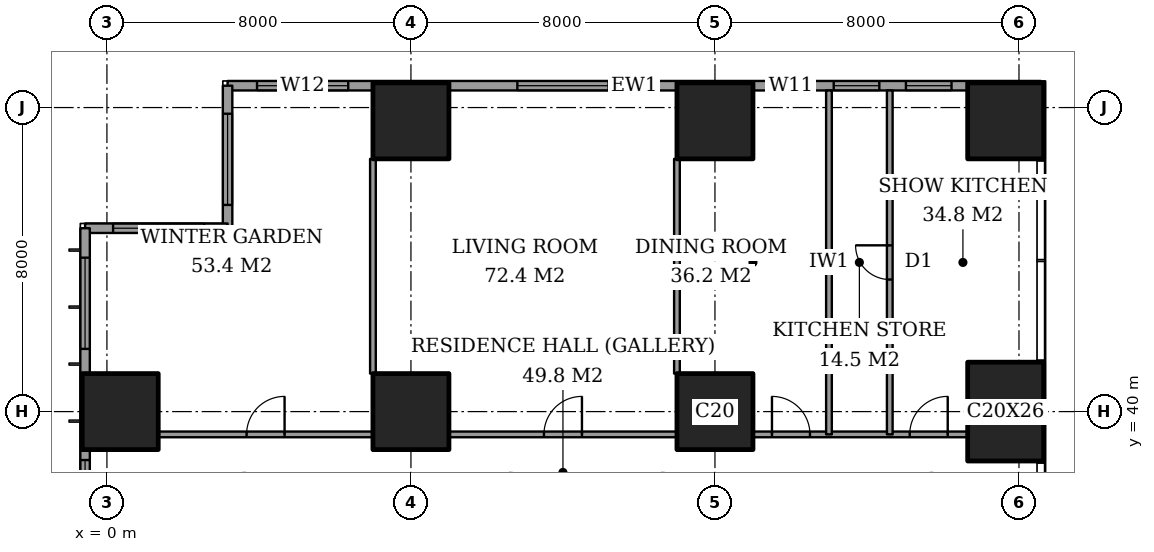
"""IFC4 building model, lengths in metres.
Left out: names, types, materials, properties, quantities, classifications, styles, units other than length and angle.
Written with IfcOpenShell. Run it as: python <this file> out.ifc"""

import sys

from ifc_helpers import new_model, si_unit, direction, frame, frame_2d, origin, origin_2d, place, context, subcontext, project, spatial, rectangle, extrude, element, fill, save


model = new_model("IFC4")
c1 = context("Model", 3, precision=1e-05, world=origin(), true_north=direction((0.0, 1.0)))
c2 = subcontext(c1, "Body", "Model", "MODEL_VIEW")
j1 = project(units=[si_unit("LENGTHUNIT", "METRE"), si_unit("PLANEANGLEUNIT", "RADIAN")], contexts=[c1])
p1 = place(None, origin())
s1 = spatial("IfcSite", under=j1, at=p1, CompositionType="ELEMENT")
p2 = place(p1, origin())
s2 = spatial("IfcBuilding", under=s1, at=p2, CompositionType="ELEMENT")
p3 = place(p2, frame((0.0, 0.0, 135.8)))
s3 = spatial("IfcBuildingStorey", under=s2, at=p3, CompositionType="ELEMENT", Elevation=135.8)
for number, where, z_axis, x_axis in (
    (1, (0.35, 40.0, 0.0), (0.0, 0.0, 1.0), (1.0, 0.0, 0.0)),
    (2, (8.0, 40.0, 0.0), (0.0, 0.0, 1.0), (1.0, 0.0, 0.0)),
    (3, (8.0, 47.65, 0.0), (0.0, 0.0, 1.0), (1.0, 0.0, 0.0)),
    (4, (16.0, 40.0, 0.0), (0.0, 0.0, 1.0), (1.0, 0.0, 0.0)),
    (5, (16.0, 47.65, 0.0), (0.0, 0.0, 1.0), (1.0, 0.0, 0.0)),
):
    element("IfcColumn", number, at=place(p3, frame(where, z_axis=z_axis, x_axis=x_axis)), inside=s3, PredefinedType="COLUMN", context=c2, shape_type="SweptSolid", body=[
        extrude(rectangle(XDim=2.0, YDim=2.0, at=origin_2d()), origin(), (0.0, 0.0, 1.0), 3.6),
    ])
p4 = place(p3, frame((23.65, 40.0, 0.0), z_axis=(0.0, 0.0, 1.0), x_axis=(1.0, 0.0, 0.0)))
e6 = element("IfcColumn", 6, at=p4, inside=s3, PredefinedType="COLUMN", context=c2, shape_type="SweptSolid", body=[
    extrude(rectangle(XDim=2.0, YDim=2.6, at=origin_2d()), origin(), (0.0, 0.0, 1.0), 3.6),
])
p5 = place(p3, frame((23.65, 47.65, 0.0), z_axis=(0.0, 0.0, 1.0), x_axis=(1.0, 0.0, 0.0)))
e7 = element("IfcColumn", 7, at=p5, inside=s3, PredefinedType="COLUMN", context=c2, shape_type="SweptSolid", body=[
    extrude(rectangle(XDim=2.0, YDim=2.0, at=origin_2d()), origin(), (0.0, 0.0, 1.0), 3.6),
])
p6 = place(p3, frame((24.575, 48.575, 0.0), z_axis=(0.0, 0.0, 1.0), x_axis=(-1.0, 0.0, 0.0)))
e8 = element("IfcWall", 8, at=p6, inside=s3, PredefinedType="SOLIDWALL", context=c2, shape_type="SweptSolid", body=[
    extrude(rectangle(XDim=21.4, YDim=0.25, at=frame_2d((10.7, 0.0))), origin(), (0.0, 0.0, 1.0), 3.6),
])
p7 = place(p6, frame((2.35, 0.0, 0.4)))
e9 = element("IfcOpeningElement", 9, at=p7, cuts=e8, PredefinedType="OPENING", context=c2, shape_type="SweptSolid", body=[
    extrude(rectangle(XDim=1.2, YDim=2.2, at=frame_2d((0.6, 1.1))), frame((0.0, 0.135, 0.0), z_axis=(0.0, -1.0, 0.0), x_axis=(1.0, 0.0, 0.0)), (0.0, 0.0, 1.0), 0.27),
])
p8 = place(p6, frame((4.25, 0.0, 0.4)))
e10 = element("IfcOpeningElement", 10, at=p8, cuts=e8, PredefinedType="OPENING", context=c2, shape_type="SweptSolid", body=[
    extrude(rectangle(XDim=1.2, YDim=2.2, at=frame_2d((0.6, 1.1))), frame((0.0, 0.135, 0.0), z_axis=(0.0, -1.0, 0.0), x_axis=(1.0, 0.0, 0.0)), (0.0, 0.0, 1.0), 0.27),
])
p9 = place(p6, frame((5.975, 0.0, 0.4)))
e11 = element("IfcOpeningElement", 11, at=p9, cuts=e8, PredefinedType="OPENING", context=c2, shape_type="SweptSolid", body=[
    extrude(rectangle(XDim=1.2, YDim=2.2, at=frame_2d((0.6, 1.1))), frame((0.0, 0.135, 0.0), z_axis=(0.0, -1.0, 0.0), x_axis=(1.0, 0.0, 0.0)), (0.0, 0.0, 1.0), 0.27),
])
p10 = place(p6, frame((11.375, 0.0, 0.4)))
e12 = element("IfcOpeningElement", 12, at=p10, cuts=e8, PredefinedType="OPENING", context=c2, shape_type="SweptSolid", body=[
    extrude(rectangle(XDim=2.4, YDim=2.2, at=frame_2d((1.2, 1.1))), frame((0.0, 0.135, 0.0), z_axis=(0.0, -1.0, 0.0), x_axis=(1.0, 0.0, 0.0)), (0.0, 0.0, 1.0), 0.27),
])
p11 = place(p6, frame((18.225, 0.0, 0.4)))
e13 = element("IfcOpeningElement", 13, at=p11, cuts=e8, PredefinedType="OPENING", context=c2, shape_type="SweptSolid", body=[
    extrude(rectangle(XDim=2.4, YDim=2.2, at=frame_2d((1.2, 1.1))), frame((0.0, 0.135, 0.0), z_axis=(0.0, -1.0, 0.0), x_axis=(1.0, 0.0, 0.0)), (0.0, 0.0, 1.0), 0.27),
])
p12 = place(p3, frame((3.175, 48.575, 0.0), z_axis=(0.0, 0.0, 1.0), x_axis=(0.0, -1.0, 0.0)))
e14 = element("IfcWall", 14, at=p12, inside=s3, PredefinedType="SOLIDWALL", context=c2, shape_type="SweptSolid", body=[
    extrude(rectangle(XDim=3.75, YDim=0.25, at=frame_2d((1.875, 0.0))), origin(), (0.0, 0.0, 1.0), 3.6),
])
p13 = place(p12, frame((0.738, 0.0, 0.4)))
e15 = element("IfcOpeningElement", 15, at=p13, cuts=e14, PredefinedType="OPENING", context=c2, shape_type="SweptSolid", body=[
    extrude(rectangle(XDim=2.4, YDim=2.2, at=frame_2d((1.2, 1.1))), frame((0.0, 0.135, 0.0), z_axis=(0.0, -1.0, 0.0), x_axis=(1.0, 0.0, 0.0)), (0.0, 0.0, 1.0), 0.27),
])
p14 = place(p3, frame((3.175, 44.825, 0.0), z_axis=(0.0, 0.0, 1.0), x_axis=(-1.0, 0.0, 0.0)))
e16 = element("IfcWall", 16, at=p14, inside=s3, PredefinedType="SOLIDWALL", context=c2, shape_type="SweptSolid", body=[
    extrude(rectangle(XDim=3.75, YDim=0.25, at=frame_2d((1.875, 0.0))), origin(), (0.0, 0.0, 1.0), 3.6),
])
p15 = place(p14, frame((0.613, 0.0, 0.4)))
e17 = element("IfcOpeningElement", 17, at=p15, cuts=e16, PredefinedType="OPENING", context=c2, shape_type="SweptSolid", body=[
    extrude(rectangle(XDim=2.4, YDim=2.2, at=frame_2d((1.2, 1.1))), frame((0.0, 0.135, 0.0), z_axis=(0.0, -1.0, 0.0), x_axis=(1.0, 0.0, 0.0)), (0.0, 0.0, 1.0), 0.27),
])
p16 = place(p3, frame((-0.575, 44.825, 0.0), z_axis=(0.0, 0.0, 1.0), x_axis=(0.0, -1.0, 0.0)))
e18 = element("IfcWall", 18, at=p16, inside=s3, PredefinedType="SOLIDWALL", context=c2, shape_type="SweptSolid", body=[
    extrude(rectangle(XDim=41.65, YDim=0.25, at=frame_2d((20.825, 0.0))), origin(), (0.0, 0.0, 1.0), 3.6),
])
p17 = place(p16, frame((0.775, 0.0, 0.4)))
e19 = element("IfcOpeningElement", 19, at=p17, cuts=e18, PredefinedType="OPENING", context=c2, shape_type="SweptSolid", body=[
    extrude(rectangle(XDim=2.4, YDim=2.2, at=frame_2d((1.2, 1.1))), frame((0.0, 0.135, 0.0), z_axis=(0.0, -1.0, 0.0), x_axis=(1.0, 0.0, 0.0)), (0.0, 0.0, 1.0), 0.27),
])
p18 = place(p16, frame((6.1, 0.0, 0.4)))
e20 = element("IfcOpeningElement", 20, at=p18, cuts=e18, PredefinedType="OPENING", context=c2, shape_type="SweptSolid", body=[
    extrude(rectangle(XDim=1.2, YDim=2.2, at=frame_2d((0.6, 1.1))), frame((0.0, 0.135, 0.0), z_axis=(0.0, -1.0, 0.0), x_axis=(1.0, 0.0, 0.0)), (0.0, 0.0, 1.0), 0.27),
])
p19 = place(p16, frame((8.425, 0.0, 0.4)))
e21 = element("IfcOpeningElement", 21, at=p19, cuts=e18, PredefinedType="OPENING", context=c2, shape_type="SweptSolid", body=[
    extrude(rectangle(XDim=2.4, YDim=2.2, at=frame_2d((1.2, 1.1))), frame((0.0, 0.135, 0.0), z_axis=(0.0, -1.0, 0.0), x_axis=(1.0, 0.0, 0.0)), (0.0, 0.0, 1.0), 0.27),
])
p20 = place(p16, frame((15.625, 0.0, 0.4)))
e22 = element("IfcOpeningElement", 22, at=p20, cuts=e18, PredefinedType="OPENING", context=c2, shape_type="SweptSolid", body=[
    extrude(rectangle(XDim=2.4, YDim=2.2, at=frame_2d((1.2, 1.1))), frame((0.0, 0.135, 0.0), z_axis=(0.0, -1.0, 0.0), x_axis=(1.0, 0.0, 0.0)), (0.0, 0.0, 1.0), 0.27),
])
p21 = place(p16, frame((23.625, 0.0, 0.4)))
e23 = element("IfcOpeningElement", 23, at=p21, cuts=e18, PredefinedType="OPENING", context=c2, shape_type="SweptSolid", body=[
    extrude(rectangle(XDim=2.4, YDim=2.2, at=frame_2d((1.2, 1.1))), frame((0.0, 0.135, 0.0), z_axis=(0.0, -1.0, 0.0), x_axis=(1.0, 0.0, 0.0)), (0.0, 0.0, 1.0), 0.27),
])
p22 = place(p16, frame((30.825, 0.0, 0.4)))
e24 = element("IfcOpeningElement", 24, at=p22, cuts=e18, PredefinedType="OPENING", context=c2, shape_type="SweptSolid", body=[
    extrude(rectangle(XDim=2.4, YDim=2.2, at=frame_2d((1.2, 1.1))), frame((0.0, 0.135, 0.0), z_axis=(0.0, -1.0, 0.0), x_axis=(1.0, 0.0, 0.0)), (0.0, 0.0, 1.0), 0.27),
])
p23 = place(p16, frame((34.5, 0.0, 0.4)))
e25 = element("IfcOpeningElement", 25, at=p23, cuts=e18, PredefinedType="OPENING", context=c2, shape_type="SweptSolid", body=[
    extrude(rectangle(XDim=1.2, YDim=2.2, at=frame_2d((0.6, 1.1))), frame((0.0, 0.135, 0.0), z_axis=(0.0, -1.0, 0.0), x_axis=(1.0, 0.0, 0.0)), (0.0, 0.0, 1.0), 0.27),
])
p24 = place(p16, frame((38.475, 0.0, 0.4)))
e26 = element("IfcOpeningElement", 26, at=p24, cuts=e18, PredefinedType="OPENING", context=c2, shape_type="SweptSolid", body=[
    extrude(rectangle(XDim=2.4, YDim=2.2, at=frame_2d((1.2, 1.1))), frame((0.0, 0.135, 0.0), z_axis=(0.0, -1.0, 0.0), x_axis=(1.0, 0.0, 0.0)), (0.0, 0.0, 1.0), 0.27),
])
p25 = place(p3, frame((1.35, 39.4, 0.0), z_axis=(0.0, 0.0, 1.0), x_axis=(1.0, 0.0, 0.0)))
e27 = element("IfcWall", 27, at=p25, inside=s3, PredefinedType="PARTITIONING", context=c2, shape_type="SweptSolid", body=[
    extrude(rectangle(XDim=5.65, YDim=0.15, at=frame_2d((2.825, 0.0))), origin(), (0.0, 0.0, 1.0), 3.35),
])
p26 = place(p25, frame((2.325, 0.0, 0.0)))
e28 = element("IfcOpeningElement", 28, at=p26, cuts=e27, PredefinedType="OPENING", context=c2, shape_type="SweptSolid", body=[
    extrude(rectangle(XDim=1.0, YDim=2.1, at=frame_2d((0.5, 1.05))), frame((0.0, 0.085, 0.0), z_axis=(0.0, -1.0, 0.0), x_axis=(1.0, 0.0, 0.0)), (0.0, 0.0, 1.0), 0.17),
])
p27 = place(p3, frame((9.0, 39.4, 0.0), z_axis=(0.0, 0.0, 1.0), x_axis=(1.0, 0.0, 0.0)))
e29 = element("IfcWall", 29, at=p27, inside=s3, PredefinedType="PARTITIONING", context=c2, shape_type="SweptSolid", body=[
    extrude(rectangle(XDim=6.0, YDim=0.15, at=frame_2d((3.0, 0.0))), origin(), (0.0, 0.0, 1.0), 3.35),
])
p28 = place(p27, frame((2.5, 0.0, 0.0)))
e30 = element("IfcOpeningElement", 30, at=p28, cuts=e29, PredefinedType="OPENING", context=c2, shape_type="SweptSolid", body=[
    extrude(rectangle(XDim=1.0, YDim=2.1, at=frame_2d((0.5, 1.05))), frame((0.0, 0.085, 0.0), z_axis=(0.0, -1.0, 0.0), x_axis=(1.0, 0.0, 0.0)), (0.0, 0.0, 1.0), 0.17),
])
p29 = place(p3, frame((17.0, 39.4, 0.0), z_axis=(0.0, 0.0, 1.0), x_axis=(1.0, 0.0, 0.0)))
e31 = element("IfcWall", 31, at=p29, inside=s3, PredefinedType="PARTITIONING", context=c2, shape_type="SweptSolid", body=[
    extrude(rectangle(XDim=5.65, YDim=0.15, at=frame_2d((2.825, 0.0))), origin(), (0.0, 0.0, 1.0), 3.35),
])
p30 = place(p29, frame((0.5, 0.0, 0.0)))
e32 = element("IfcOpeningElement", 32, at=p30, cuts=e31, PredefinedType="OPENING", context=c2, shape_type="SweptSolid", body=[
    extrude(rectangle(XDim=1.0, YDim=2.1, at=frame_2d((0.5, 1.05))), frame((0.0, 0.085, 0.0), z_axis=(0.0, -1.0, 0.0), x_axis=(1.0, 0.0, 0.0)), (0.0, 0.0, 1.0), 0.17),
])
p31 = place(p29, frame((4.125, 0.0, 0.0)))
e33 = element("IfcOpeningElement", 33, at=p31, cuts=e31, PredefinedType="OPENING", context=c2, shape_type="SweptSolid", body=[
    extrude(rectangle(XDim=1.0, YDim=2.1, at=frame_2d((0.5, 1.05))), frame((0.0, 0.085, 0.0), z_axis=(0.0, -1.0, 0.0), x_axis=(1.0, 0.0, 0.0)), (0.0, 0.0, 1.0), 0.17),
])
for number, where, z_axis, x_axis in (
    (34, (7.0, 41.0, 0.0), (0.0, 0.0, 1.0), (0.0, 1.0, 0.0)),
    (35, (15.0, 41.0, 0.0), (0.0, 0.0, 1.0), (0.0, 1.0, 0.0)),
):
    element("IfcWall", number, at=place(p3, frame(where, z_axis=z_axis, x_axis=x_axis)), inside=s3, PredefinedType="PARTITIONING", context=c2, shape_type="SweptSolid", body=[
        extrude(rectangle(XDim=5.65, YDim=0.15, at=frame_2d((2.825, 0.0))), origin(), (0.0, 0.0, 1.0), 3.35),
    ])
p32 = place(p3, frame((19.0, 39.4, 0.0), z_axis=(0.0, 0.0, 1.0), x_axis=(0.0, 1.0, 0.0)))
e36 = element("IfcWall", 36, at=p32, inside=s3, PredefinedType="PARTITIONING", context=c2, shape_type="SweptSolid", body=[
    extrude(rectangle(XDim=9.05, YDim=0.15, at=frame_2d((4.525, 0.0))), origin(), (0.0, 0.0, 1.0), 3.35),
])
p33 = place(p3, frame((20.6, 39.4, 0.0), z_axis=(0.0, 0.0, 1.0), x_axis=(0.0, 1.0, 0.0)))
e37 = element("IfcWall", 37, at=p33, inside=s3, PredefinedType="PARTITIONING", context=c2, shape_type="SweptSolid", body=[
    extrude(rectangle(XDim=9.05, YDim=0.15, at=frame_2d((4.525, 0.0))), origin(), (0.0, 0.0, 1.0), 3.35),
])
p34 = place(p33, frame((4.075, 0.0, 0.0)))
e38 = element("IfcOpeningElement", 38, at=p34, cuts=e37, PredefinedType="OPENING", context=c2, shape_type="SweptSolid", body=[
    extrude(rectangle(XDim=0.9, YDim=2.1, at=frame_2d((0.45, 1.05))), frame((0.0, 0.085, 0.0), z_axis=(0.0, -1.0, 0.0), x_axis=(1.0, 0.0, 0.0)), (0.0, 0.0, 1.0), 0.17),
])
p35 = place(p7, origin())
e39 = element("IfcWindow", 39, at=p35, inside=s3, PartitioningType="SINGLE_PANEL", PredefinedType="WINDOW", context=c2, shape_type="SweptSolid", body=[
    extrude(rectangle(XDim=1.2, YDim=2.2, at=frame_2d((0.6, 1.1))), frame((0.0, 0.03, 0.0), z_axis=(0.0, -1.0, 0.0), x_axis=(1.0, 0.0, 0.0)), (0.0, 0.0, 1.0), 0.06),
])
fill(e9, e39)
p36 = place(p8, origin())
e40 = element("IfcWindow", 40, at=p36, inside=s3, PartitioningType="SINGLE_PANEL", PredefinedType="WINDOW", context=c2, shape_type="SweptSolid", body=[
    extrude(rectangle(XDim=1.2, YDim=2.2, at=frame_2d((0.6, 1.1))), frame((0.0, 0.03, 0.0), z_axis=(0.0, -1.0, 0.0), x_axis=(1.0, 0.0, 0.0)), (0.0, 0.0, 1.0), 0.06),
])
fill(e10, e40)
p37 = place(p9, origin())
e41 = element("IfcWindow", 41, at=p37, inside=s3, PartitioningType="SINGLE_PANEL", PredefinedType="WINDOW", context=c2, shape_type="SweptSolid", body=[
    extrude(rectangle(XDim=1.2, YDim=2.2, at=frame_2d((0.6, 1.1))), frame((0.0, 0.03, 0.0), z_axis=(0.0, -1.0, 0.0), x_axis=(1.0, 0.0, 0.0)), (0.0, 0.0, 1.0), 0.06),
])
fill(e11, e41)
p38 = place(p10, origin())
e42 = element("IfcWindow", 42, at=p38, inside=s3, PartitioningType="SINGLE_PANEL", PredefinedType="WINDOW", context=c2, shape_type="SweptSolid", body=[
    extrude(rectangle(XDim=2.4, YDim=2.2, at=frame_2d((1.2, 1.1))), frame((0.0, 0.03, 0.0), z_axis=(0.0, -1.0, 0.0), x_axis=(1.0, 0.0, 0.0)), (0.0, 0.0, 1.0), 0.06),
])
fill(e12, e42)
p39 = place(p11, origin())
e43 = element("IfcWindow", 43, at=p39, inside=s3, PartitioningType="SINGLE_PANEL", PredefinedType="WINDOW", context=c2, shape_type="SweptSolid", body=[
    extrude(rectangle(XDim=2.4, YDim=2.2, at=frame_2d((1.2, 1.1))), frame((0.0, 0.03, 0.0), z_axis=(0.0, -1.0, 0.0), x_axis=(1.0, 0.0, 0.0)), (0.0, 0.0, 1.0), 0.06),
])
fill(e13, e43)
p40 = place(p13, origin())
e44 = element("IfcWindow", 44, at=p40, inside=s3, PartitioningType="SINGLE_PANEL", PredefinedType="WINDOW", context=c2, shape_type="SweptSolid", body=[
    extrude(rectangle(XDim=2.4, YDim=2.2, at=frame_2d((1.2, 1.1))), frame((0.0, 0.03, 0.0), z_axis=(0.0, -1.0, 0.0), x_axis=(1.0, 0.0, 0.0)), (0.0, 0.0, 1.0), 0.06),
])
fill(e15, e44)
p41 = place(p15, origin())
e45 = element("IfcWindow", 45, at=p41, inside=s3, PartitioningType="SINGLE_PANEL", PredefinedType="WINDOW", context=c2, shape_type="SweptSolid", body=[
    extrude(rectangle(XDim=2.4, YDim=2.2, at=frame_2d((1.2, 1.1))), frame((0.0, 0.03, 0.0), z_axis=(0.0, -1.0, 0.0), x_axis=(1.0, 0.0, 0.0)), (0.0, 0.0, 1.0), 0.06),
])
fill(e17, e45)
p42 = place(p17, origin())
e46 = element("IfcWindow", 46, at=p42, inside=s3, PartitioningType="SINGLE_PANEL", PredefinedType="WINDOW", context=c2, shape_type="SweptSolid", body=[
    extrude(rectangle(XDim=2.4, YDim=2.2, at=frame_2d((1.2, 1.1))), frame((0.0, 0.03, 0.0), z_axis=(0.0, -1.0, 0.0), x_axis=(1.0, 0.0, 0.0)), (0.0, 0.0, 1.0), 0.06),
])
fill(e19, e46)
p43 = place(p18, origin())
e47 = element("IfcWindow", 47, at=p43, inside=s3, PartitioningType="SINGLE_PANEL", PredefinedType="WINDOW", context=c2, shape_type="SweptSolid", body=[
    extrude(rectangle(XDim=1.2, YDim=2.2, at=frame_2d((0.6, 1.1))), frame((0.0, 0.03, 0.0), z_axis=(0.0, -1.0, 0.0), x_axis=(1.0, 0.0, 0.0)), (0.0, 0.0, 1.0), 0.06),
])
fill(e20, e47)
p44 = place(p26, origin())
e48 = element("IfcDoor", 48, at=p44, inside=s3, OperationType="SINGLE_SWING_LEFT", PredefinedType="DOOR", context=c2, shape_type="SweptSolid", body=[
    extrude(rectangle(XDim=1.0, YDim=2.1, at=frame_2d((0.5, 1.05))), frame((0.0, 0.025, 0.0), z_axis=(0.0, -1.0, 0.0), x_axis=(1.0, 0.0, 0.0)), (0.0, 0.0, 1.0), 0.05),
])
fill(e28, e48)
p45 = place(p28, origin())
e49 = element("IfcDoor", 49, at=p45, inside=s3, OperationType="SINGLE_SWING_LEFT", PredefinedType="DOOR", context=c2, shape_type="SweptSolid", body=[
    extrude(rectangle(XDim=1.0, YDim=2.1, at=frame_2d((0.5, 1.05))), frame((0.0, 0.025, 0.0), z_axis=(0.0, -1.0, 0.0), x_axis=(1.0, 0.0, 0.0)), (0.0, 0.0, 1.0), 0.05),
])
fill(e30, e49)
p46 = place(p30, origin())
e50 = element("IfcDoor", 50, at=p46, inside=s3, OperationType="SINGLE_SWING_RIGHT", PredefinedType="DOOR", context=c2, shape_type="SweptSolid", body=[
    extrude(rectangle(XDim=1.0, YDim=2.1, at=frame_2d((0.5, 1.05))), frame((0.0, 0.025, 0.0), z_axis=(0.0, -1.0, 0.0), x_axis=(1.0, 0.0, 0.0)), (0.0, 0.0, 1.0), 0.05),
])
fill(e32, e50)
p47 = place(p34, origin())
e51 = element("IfcDoor", 51, at=p47, inside=s3, OperationType="SINGLE_SWING_LEFT", PredefinedType="DOOR", context=c2, shape_type="SweptSolid", body=[
    extrude(rectangle(XDim=0.9, YDim=2.1, at=frame_2d((0.45, 1.05))), frame((0.0, 0.025, 0.0), z_axis=(0.0, -1.0, 0.0), x_axis=(1.0, 0.0, 0.0)), (0.0, 0.0, 1.0), 0.05),
])
fill(e38, e51)
p48 = place(p31, origin())
e52 = element("IfcDoor", 52, at=p48, inside=s3, OperationType="SINGLE_SWING_LEFT", PredefinedType="DOOR", context=c2, shape_type="SweptSolid", body=[
    extrude(rectangle(XDim=1.0, YDim=2.1, at=frame_2d((0.5, 1.05))), frame((0.0, 0.025, 0.0), z_axis=(0.0, -1.0, 0.0), x_axis=(1.0, 0.0, 0.0)), (0.0, 0.0, 1.0), 0.05),
])
fill(e33, e52)
save(model, sys.argv[1])
